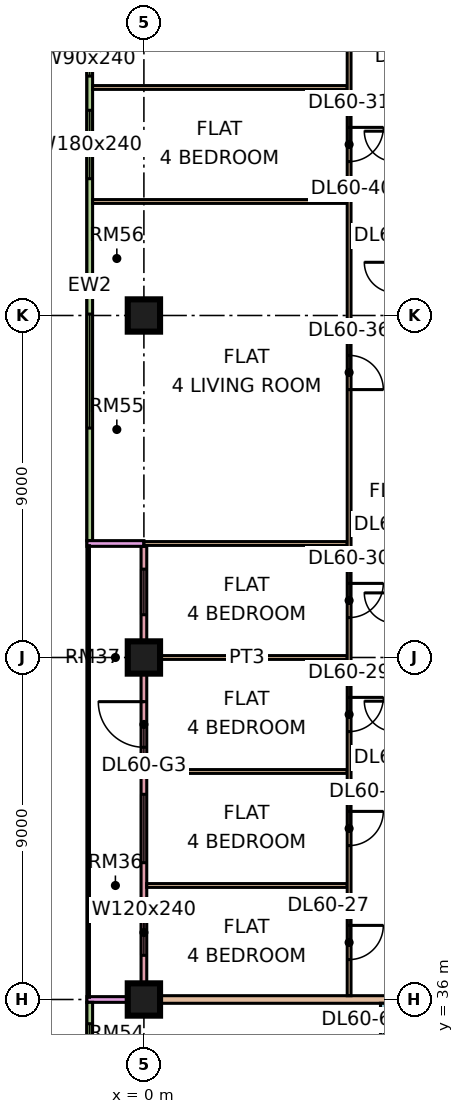
"""IFC4 building model, lengths in metres.
Left out: names, types, materials, properties, quantities, classifications, styles, units other than length and angle.
Written with IfcOpenShell. Run it as: python <this file> out.ifc"""

import sys

from ifc_helpers import new_model, si_unit, direction, frame, frame_2d, origin, origin_2d, place, context, subcontext, project, spatial, rectangle, extrude, element, fill, save


model = new_model("IFC4")
c1 = context("Model", 3, precision=1e-05, world=origin(), true_north=direction((0.0, 1.0)))
c2 = subcontext(c1, "Body", "Model", "MODEL_VIEW")
j1 = project(units=[si_unit("LENGTHUNIT", "METRE"), si_unit("PLANEANGLEUNIT", "RADIAN")], contexts=[c1])
p1 = place(None, origin())
s1 = spatial("IfcSite", under=j1, at=p1, CompositionType="ELEMENT")
p2 = place(p1, origin())
s2 = spatial("IfcBuilding", under=s1, at=p2, CompositionType="ELEMENT")
p3 = place(p2, frame((0.0, 0.0, 252.9)))
s3 = spatial("IfcBuildingStorey", under=s2, at=p3, CompositionType="ELEMENT", Elevation=252.9)
p4 = place(p3, frame((0.0, 36.0, 0.0), z_axis=(0.0, 0.0, 1.0), x_axis=(1.0, 0.0, 0.0)))
e1 = element("IfcColumn", 1, at=p4, inside=s3, PredefinedType="COLUMN", context=c2, shape_type="SweptSolid", body=[
    extrude(rectangle(XDim=0.85, YDim=0.85, at=origin_2d()), origin(), (0.0, 0.0, 1.0), 3.75),
])
for number, where, z_axis, x_axis in (
    (2, (0.0, 45.0, 0.0), (0.0, 0.0, 1.0), (1.0, 0.0, 0.0)),
    (3, (0.0, 54.0, 0.0), (0.0, 0.0, 1.0), (1.0, 0.0, 0.0)),
):
    element("IfcColumn", number, at=place(p3, frame(where, z_axis=z_axis, x_axis=x_axis)), inside=s3, PredefinedType="COLUMN", context=c2, shape_type="SweptSolid", body=[
        extrude(rectangle(XDim=0.85, YDim=0.85, at=origin_2d()), origin(), (0.0, 0.0, 1.0), 3.75),
    ])
p5 = place(p3, frame((-1.425, 61.5, 0.0), z_axis=(0.0, 0.0, 1.0), x_axis=(0.0, -1.0, 0.0)))
e4 = element("IfcWall", 4, at=p5, inside=s3, PredefinedType="SOLIDWALL", context=c2, shape_type="SweptSolid", body=[
    extrude(rectangle(XDim=13.425, YDim=0.15, at=frame_2d((6.712, 0.0))), origin(), (0.0, 0.0, 1.0), 3.3),
])
p6 = place(p5, frame((0.3, 0.0, 0.45)))
e5 = element("IfcOpeningElement", 5, at=p6, cuts=e4, PredefinedType="OPENING", context=c2, shape_type="SweptSolid", body=[
    extrude(rectangle(XDim=0.9, YDim=2.4, at=frame_2d((0.45, 1.2))), frame((0.0, 0.085, 0.0), z_axis=(0.0, -1.0, 0.0), x_axis=(1.0, 0.0, 0.0)), (0.0, 0.0, 1.0), 0.17),
])
p7 = place(p5, frame((2.1, 0.0, 0.45)))
e6 = element("IfcOpeningElement", 6, at=p7, cuts=e4, PredefinedType="OPENING", context=c2, shape_type="SweptSolid", body=[
    extrude(rectangle(XDim=1.8, YDim=2.4, at=frame_2d((0.9, 1.2))), frame((0.0, 0.085, 0.0), z_axis=(0.0, -1.0, 0.0), x_axis=(1.0, 0.0, 0.0)), (0.0, 0.0, 1.0), 0.17),
])
p8 = place(p5, frame((7.462, 0.0, 0.45)))
e7 = element("IfcOpeningElement", 7, at=p8, cuts=e4, PredefinedType="OPENING", context=c2, shape_type="SweptSolid", body=[
    extrude(rectangle(XDim=3.0, YDim=2.4, at=frame_2d((1.5, 1.2))), frame((0.0, 0.085, 0.0), z_axis=(0.0, -1.0, 0.0), x_axis=(1.0, 0.0, 0.0)), (0.0, 0.0, 1.0), 0.17),
])
p9 = place(p3, frame((0.0, 47.925, 0.0), z_axis=(0.0, 0.0, 1.0), x_axis=(0.0, -1.0, 0.0)))
e8 = element("IfcWall", 8, at=p9, inside=s3, PredefinedType="SOLIDWALL", context=c2, shape_type="SweptSolid", body=[
    extrude(rectangle(XDim=11.85, YDim=0.15, at=frame_2d((5.925, 0.0))), origin(), (0.0, 0.0, 1.0), 3.3),
])
p10 = place(p9, frame((0.6, 0.0, 0.45)))
e9 = element("IfcOpeningElement", 9, at=p10, cuts=e8, PredefinedType="OPENING", context=c2, shape_type="SweptSolid", body=[
    extrude(rectangle(XDim=1.2, YDim=2.4, at=frame_2d((0.6, 1.2))), frame((0.0, 0.085, 0.0), z_axis=(0.0, -1.0, 0.0), x_axis=(1.0, 0.0, 0.0)), (0.0, 0.0, 1.0), 0.17),
])
p11 = place(p9, frame((4.087, 0.0, 0.0)))
e10 = element("IfcOpeningElement", 10, at=p11, cuts=e8, PredefinedType="OPENING", context=c2, shape_type="SweptSolid", body=[
    extrude(rectangle(XDim=1.2, YDim=2.4, at=frame_2d((0.6, 1.2))), frame((0.0, 0.085, 0.0), z_axis=(0.0, -1.0, 0.0), x_axis=(1.0, 0.0, 0.0)), (0.0, 0.0, 1.0), 0.17),
])
p12 = place(p9, frame((6.525, 0.0, 0.45)))
e11 = element("IfcOpeningElement", 11, at=p12, cuts=e8, PredefinedType="OPENING", context=c2, shape_type="SweptSolid", body=[
    extrude(rectangle(XDim=1.8, YDim=2.4, at=frame_2d((0.9, 1.2))), frame((0.0, 0.085, 0.0), z_axis=(0.0, -1.0, 0.0), x_axis=(1.0, 0.0, 0.0)), (0.0, 0.0, 1.0), 0.17),
])
p13 = place(p9, frame((9.562, 0.0, 0.45)))
e12 = element("IfcOpeningElement", 12, at=p13, cuts=e8, PredefinedType="OPENING", context=c2, shape_type="SweptSolid", body=[
    extrude(rectangle(XDim=1.2, YDim=2.4, at=frame_2d((0.6, 1.2))), frame((0.0, 0.085, 0.0), z_axis=(0.0, -1.0, 0.0), x_axis=(1.0, 0.0, 0.0)), (0.0, 0.0, 1.0), 0.17),
])
for number, where, z_axis, x_axis in (
    (13, (-1.5, 48.0, 0.0), (0.0, 0.0, 1.0), (1.0, 0.0, 0.0)),
    (14, (-1.5, 36.0, 0.0), (0.0, 0.0, 1.0), (1.0, 0.0, 0.0)),
):
    element("IfcWall", number, at=place(p3, frame(where, z_axis=z_axis, x_axis=x_axis)), inside=s3, PredefinedType="SOLIDWALL", context=c2, shape_type="SweptSolid", body=[
        extrude(rectangle(XDim=1.5, YDim=0.15, at=frame_2d((0.75, 0.0))), origin(), (0.0, 0.0, 1.0), 3.3),
    ])
p14 = place(p3, frame((-1.425, 35.925, 0.0), z_axis=(0.0, 0.0, 1.0), x_axis=(0.0, -1.0, 0.0)))
e15 = element("IfcWall", 15, at=p14, inside=s3, PredefinedType="SOLIDWALL", context=c2, shape_type="SweptSolid", body=[
    extrude(rectangle(XDim=11.85, YDim=0.15, at=frame_2d((5.925, 0.0))), origin(), (0.0, 0.0, 1.0), 3.3),
])
p15 = place(p14, frame((0.562, 0.0, 0.45)))
e16 = element("IfcOpeningElement", 16, at=p15, cuts=e15, PredefinedType="OPENING", context=c2, shape_type="SweptSolid", body=[
    extrude(rectangle(XDim=1.8, YDim=2.4, at=frame_2d((0.9, 1.2))), frame((0.0, 0.085, 0.0), z_axis=(0.0, -1.0, 0.0), x_axis=(1.0, 0.0, 0.0)), (0.0, 0.0, 1.0), 0.17),
])
p16 = place(p14, frame((3.525, 0.0, 0.45)))
e17 = element("IfcOpeningElement", 17, at=p16, cuts=e15, PredefinedType="OPENING", context=c2, shape_type="SweptSolid", body=[
    extrude(rectangle(XDim=1.8, YDim=2.4, at=frame_2d((0.9, 1.2))), frame((0.0, 0.085, 0.0), z_axis=(0.0, -1.0, 0.0), x_axis=(1.0, 0.0, 0.0)), (0.0, 0.0, 1.0), 0.17),
])
p17 = place(p14, frame((6.525, 0.0, 0.45)))
e18 = element("IfcOpeningElement", 18, at=p17, cuts=e15, PredefinedType="OPENING", context=c2, shape_type="SweptSolid", body=[
    extrude(rectangle(XDim=1.8, YDim=2.4, at=frame_2d((0.9, 1.2))), frame((0.0, 0.085, 0.0), z_axis=(0.0, -1.0, 0.0), x_axis=(1.0, 0.0, 0.0)), (0.0, 0.0, 1.0), 0.17),
])
p18 = place(p14, frame((9.488, 0.0, 0.45)))
e19 = element("IfcOpeningElement", 19, at=p18, cuts=e15, PredefinedType="OPENING", context=c2, shape_type="SweptSolid", body=[
    extrude(rectangle(XDim=1.8, YDim=2.4, at=frame_2d((0.9, 1.2))), frame((0.0, 0.085, 0.0), z_axis=(0.0, -1.0, 0.0), x_axis=(1.0, 0.0, 0.0)), (0.0, 0.0, 1.0), 0.17),
])
p19 = place(p3, frame((-1.351, 60.0, 0.0), z_axis=(0.0, 0.0, 1.0), x_axis=(1.0, 0.0, 0.0)))
e20 = element("IfcWall", 20, at=p19, inside=s3, PredefinedType="PARTITIONING", context=c2, shape_type="SweptSolid", body=[
    extrude(rectangle(XDim=6.701, YDim=0.1, at=frame_2d((3.351, 0.0))), origin(), (0.0, 0.0, 1.0), 3.3),
])
e21 = element("IfcWall", 21, at=p4, inside=s3, PredefinedType="PARTITIONING", context=c2, shape_type="SweptSolid", body=[
    extrude(rectangle(XDim=6.375, YDim=0.2, at=frame_2d((3.188, 0.0))), origin(), (0.0, 0.0, 1.0), 3.3),
])
p20 = place(p3, frame((0.0, 48.0, 0.0), z_axis=(0.0, 0.0, 1.0), x_axis=(1.0, 0.0, 0.0)))
e22 = element("IfcWall", 22, at=p20, inside=s3, PredefinedType="PARTITIONING", context=c2, shape_type="SweptSolid", body=[
    extrude(rectangle(XDim=5.35, YDim=0.1, at=frame_2d((2.675, 0.0))), origin(), (0.0, 0.0, 1.0), 3.3),
])
p21 = place(p3, frame((-1.35, 57.0, 0.0), z_axis=(0.0, 0.0, 1.0), x_axis=(1.0, 0.0, 0.0)))
e23 = element("IfcWall", 23, at=p21, inside=s3, PredefinedType="PARTITIONING", context=c2, shape_type="SweptSolid", body=[
    extrude(rectangle(XDim=6.7, YDim=0.1, at=frame_2d((3.35, 0.0))), origin(), (0.0, 0.0, 1.0), 3.3),
])
for number, where, z_axis, x_axis in (
    (24, (0.074, 39.0, 0.0), (0.0, 0.0, 1.0), (1.0, 0.0, 0.0)),
    (25, (0.074, 42.0, 0.0), (0.0, 0.0, 1.0), (1.0, 0.0, 0.0)),
    (26, (0.074, 45.0, 0.0), (0.0, 0.0, 1.0), (1.0, 0.0, 0.0)),
):
    element("IfcWall", number, at=place(p3, frame(where, z_axis=z_axis, x_axis=x_axis)), inside=s3, PredefinedType="PARTITIONING", context=c2, shape_type="SweptSolid", body=[
        extrude(rectangle(XDim=5.276, YDim=0.1, at=frame_2d((2.638, 0.0))), origin(), (0.0, 0.0, 1.0), 3.3),
    ])
p22 = place(p3, frame((5.4, 36.1, 0.0), z_axis=(0.0, 0.0, 1.0), x_axis=(0.0, 1.0, 0.0)))
e27 = element("IfcWall", 27, at=p22, inside=s3, PredefinedType="PARTITIONING", context=c2, shape_type="SweptSolid", body=[
    extrude(rectangle(XDim=26.95, YDim=0.1, at=frame_2d((13.475, 0.0))), origin(), (0.0, 0.0, 1.0), 3.3),
])
p23 = place(p22, frame((0.95, 0.0, 0.0)))
e28 = element("IfcOpeningElement", 28, at=p23, cuts=e27, PredefinedType="OPENING", context=c2, shape_type="SweptSolid", body=[
    extrude(rectangle(XDim=0.9, YDim=2.1, at=frame_2d((0.45, 1.05))), frame((0.0, 0.06, 0.0), z_axis=(0.0, -1.0, 0.0), x_axis=(1.0, 0.0, 0.0)), (0.0, 0.0, 1.0), 0.12),
])
p24 = place(p22, frame((3.95, 0.0, 0.0)))
e29 = element("IfcOpeningElement", 29, at=p24, cuts=e27, PredefinedType="OPENING", context=c2, shape_type="SweptSolid", body=[
    extrude(rectangle(XDim=0.9, YDim=2.1, at=frame_2d((0.45, 1.05))), frame((0.0, 0.06, 0.0), z_axis=(0.0, -1.0, 0.0), x_axis=(1.0, 0.0, 0.0)), (0.0, 0.0, 1.0), 0.12),
])
p25 = place(p22, frame((6.95, 0.0, 0.0)))
e30 = element("IfcOpeningElement", 30, at=p25, cuts=e27, PredefinedType="OPENING", context=c2, shape_type="SweptSolid", body=[
    extrude(rectangle(XDim=0.9, YDim=2.1, at=frame_2d((0.45, 1.05))), frame((0.0, 0.06, 0.0), z_axis=(0.0, -1.0, 0.0), x_axis=(1.0, 0.0, 0.0)), (0.0, 0.0, 1.0), 0.12),
])
p26 = place(p22, frame((9.95, 0.0, 0.0)))
e31 = element("IfcOpeningElement", 31, at=p26, cuts=e27, PredefinedType="OPENING", context=c2, shape_type="SweptSolid", body=[
    extrude(rectangle(XDim=0.9, YDim=2.1, at=frame_2d((0.45, 1.05))), frame((0.0, 0.06, 0.0), z_axis=(0.0, -1.0, 0.0), x_axis=(1.0, 0.0, 0.0)), (0.0, 0.0, 1.0), 0.12),
])
p27 = place(p22, frame((21.95, 0.0, 0.0)))
e32 = element("IfcOpeningElement", 32, at=p27, cuts=e27, PredefinedType="OPENING", context=c2, shape_type="SweptSolid", body=[
    extrude(rectangle(XDim=0.9, YDim=2.1, at=frame_2d((0.45, 1.05))), frame((0.0, 0.06, 0.0), z_axis=(0.0, -1.0, 0.0), x_axis=(1.0, 0.0, 0.0)), (0.0, 0.0, 1.0), 0.12),
])
p28 = place(p22, frame((24.95, 0.0, 0.0)))
e33 = element("IfcOpeningElement", 33, at=p28, cuts=e27, PredefinedType="OPENING", context=c2, shape_type="SweptSolid", body=[
    extrude(rectangle(XDim=0.9, YDim=2.1, at=frame_2d((0.45, 1.05))), frame((0.0, 0.06, 0.0), z_axis=(0.0, -1.0, 0.0), x_axis=(1.0, 0.0, 0.0)), (0.0, 0.0, 1.0), 0.12),
])
p29 = place(p22, frame((15.95, 0.0, 0.0)))
e34 = element("IfcOpeningElement", 34, at=p29, cuts=e27, PredefinedType="OPENING", context=c2, shape_type="SweptSolid", body=[
    extrude(rectangle(XDim=0.9, YDim=2.1, at=frame_2d((0.45, 1.05))), frame((0.0, 0.06, 0.0), z_axis=(0.0, -1.0, 0.0), x_axis=(1.0, 0.0, 0.0)), (0.0, 0.0, 1.0), 0.12),
])
p30 = place(p3, frame((6.3, 26.325, 0.0), z_axis=(0.0, 0.0, 1.0), x_axis=(0.0, 1.0, 0.0)))
e35 = element("IfcWall", 35, at=p30, inside=s3, PredefinedType="PARTITIONING", context=c2, shape_type="SweptSolid", body=[
    extrude(rectangle(XDim=9.575, YDim=0.15, at=frame_2d((4.788, 0.0))), origin(), (0.0, 0.0, 1.0), 3.3),
])
p31 = place(p30, frame((4.575, 0.0, 0.0)))
e36 = element("IfcOpeningElement", 36, at=p31, cuts=e35, PredefinedType="OPENING", context=c2, shape_type="SweptSolid", body=[
    extrude(rectangle(XDim=0.8, YDim=2.1, at=frame_2d((0.4, 1.05))), frame((0.0, 0.085, 0.0), z_axis=(0.0, -1.0, 0.0), x_axis=(1.0, 0.0, 0.0)), (0.0, 0.0, 1.0), 0.17),
])
p32 = place(p30, frame((7.725, 0.0, 0.0)))
e37 = element("IfcOpeningElement", 37, at=p32, cuts=e35, PredefinedType="OPENING", context=c2, shape_type="SweptSolid", body=[
    extrude(rectangle(XDim=0.9, YDim=2.1, at=frame_2d((0.45, 1.05))), frame((0.0, 0.085, 0.0), z_axis=(0.0, -1.0, 0.0), x_axis=(1.0, 0.0, 0.0)), (0.0, 0.0, 1.0), 0.17),
])
p33 = place(p6, origin())
e38 = element("IfcWindow", 38, at=p33, inside=s3, PartitioningType="SINGLE_PANEL", PredefinedType="WINDOW", context=c2, shape_type="SweptSolid", body=[
    extrude(rectangle(XDim=0.9, YDim=2.4, at=frame_2d((0.45, 1.2))), frame((0.0, 0.03, 0.0), z_axis=(0.0, -1.0, 0.0), x_axis=(1.0, 0.0, 0.0)), (0.0, 0.0, 1.0), 0.06),
])
fill(e5, e38)
p34 = place(p7, origin())
e39 = element("IfcWindow", 39, at=p34, inside=s3, PartitioningType="SINGLE_PANEL", PredefinedType="WINDOW", context=c2, shape_type="SweptSolid", body=[
    extrude(rectangle(XDim=1.8, YDim=2.4, at=frame_2d((0.9, 1.2))), frame((0.0, 0.03, 0.0), z_axis=(0.0, -1.0, 0.0), x_axis=(1.0, 0.0, 0.0)), (0.0, 0.0, 1.0), 0.06),
])
fill(e6, e39)
p35 = place(p8, origin())
e40 = element("IfcWindow", 40, at=p35, inside=s3, PartitioningType="SINGLE_PANEL", PredefinedType="WINDOW", context=c2, shape_type="SweptSolid", body=[
    extrude(rectangle(XDim=3.0, YDim=2.4, at=frame_2d((1.5, 1.2))), frame((0.0, 0.03, 0.0), z_axis=(0.0, -1.0, 0.0), x_axis=(1.0, 0.0, 0.0)), (0.0, 0.0, 1.0), 0.06),
])
fill(e7, e40)
p36 = place(p10, origin())
e41 = element("IfcWindow", 41, at=p36, inside=s3, PartitioningType="SINGLE_PANEL", PredefinedType="WINDOW", context=c2, shape_type="SweptSolid", body=[
    extrude(rectangle(XDim=1.2, YDim=2.4, at=frame_2d((0.6, 1.2))), frame((0.0, 0.03, 0.0), z_axis=(0.0, -1.0, 0.0), x_axis=(1.0, 0.0, 0.0)), (0.0, 0.0, 1.0), 0.06),
])
fill(e9, e41)
p37 = place(p11, frame((1.2, 0.0, 0.0), z_axis=(0.0, 0.0, 1.0), x_axis=(-1.0, 0.0, 0.0)))
e42 = element("IfcDoor", 42, at=p37, inside=s3, OperationType="DOUBLE_DOOR_SINGLE_SWING", PredefinedType="DOOR", context=c2, shape_type="SweptSolid", body=[
    extrude(rectangle(XDim=1.2, YDim=2.4, at=frame_2d((0.6, 1.2))), frame((0.0, 0.025, 0.0), z_axis=(0.0, -1.0, 0.0), x_axis=(1.0, 0.0, 0.0)), (0.0, 0.0, 1.0), 0.05),
])
fill(e10, e42)
p38 = place(p12, origin())
e43 = element("IfcWindow", 43, at=p38, inside=s3, PartitioningType="SINGLE_PANEL", PredefinedType="WINDOW", context=c2, shape_type="SweptSolid", body=[
    extrude(rectangle(XDim=1.8, YDim=2.4, at=frame_2d((0.9, 1.2))), frame((0.0, 0.03, 0.0), z_axis=(0.0, -1.0, 0.0), x_axis=(1.0, 0.0, 0.0)), (0.0, 0.0, 1.0), 0.06),
])
fill(e11, e43)
p39 = place(p13, origin())
e44 = element("IfcWindow", 44, at=p39, inside=s3, PartitioningType="SINGLE_PANEL", PredefinedType="WINDOW", context=c2, shape_type="SweptSolid", body=[
    extrude(rectangle(XDim=1.2, YDim=2.4, at=frame_2d((0.6, 1.2))), frame((0.0, 0.03, 0.0), z_axis=(0.0, -1.0, 0.0), x_axis=(1.0, 0.0, 0.0)), (0.0, 0.0, 1.0), 0.06),
])
fill(e12, e44)
p40 = place(p15, origin())
e45 = element("IfcWindow", 45, at=p40, inside=s3, PartitioningType="SINGLE_PANEL", PredefinedType="WINDOW", context=c2, shape_type="SweptSolid", body=[
    extrude(rectangle(XDim=1.8, YDim=2.4, at=frame_2d((0.9, 1.2))), frame((0.0, 0.03, 0.0), z_axis=(0.0, -1.0, 0.0), x_axis=(1.0, 0.0, 0.0)), (0.0, 0.0, 1.0), 0.06),
])
fill(e16, e45)
p41 = place(p23, origin())
e46 = element("IfcDoor", 46, at=p41, inside=s3, OperationType="SINGLE_SWING_RIGHT", PredefinedType="DOOR", context=c2, shape_type="SweptSolid", body=[
    extrude(rectangle(XDim=0.9, YDim=2.1, at=frame_2d((0.45, 1.05))), frame((0.0, 0.025, 0.0), z_axis=(0.0, -1.0, 0.0), x_axis=(1.0, 0.0, 0.0)), (0.0, 0.0, 1.0), 0.05),
])
fill(e28, e46)
p42 = place(p24, origin())
e47 = element("IfcDoor", 47, at=p42, inside=s3, OperationType="SINGLE_SWING_RIGHT", PredefinedType="DOOR", context=c2, shape_type="SweptSolid", body=[
    extrude(rectangle(XDim=0.9, YDim=2.1, at=frame_2d((0.45, 1.05))), frame((0.0, 0.025, 0.0), z_axis=(0.0, -1.0, 0.0), x_axis=(1.0, 0.0, 0.0)), (0.0, 0.0, 1.0), 0.05),
])
fill(e29, e47)
p43 = place(p25, origin())
e48 = element("IfcDoor", 48, at=p43, inside=s3, OperationType="SINGLE_SWING_RIGHT", PredefinedType="DOOR", context=c2, shape_type="SweptSolid", body=[
    extrude(rectangle(XDim=0.9, YDim=2.1, at=frame_2d((0.45, 1.05))), frame((0.0, 0.025, 0.0), z_axis=(0.0, -1.0, 0.0), x_axis=(1.0, 0.0, 0.0)), (0.0, 0.0, 1.0), 0.05),
])
fill(e30, e48)
p44 = place(p26, origin())
e49 = element("IfcDoor", 49, at=p44, inside=s3, OperationType="SINGLE_SWING_RIGHT", PredefinedType="DOOR", context=c2, shape_type="SweptSolid", body=[
    extrude(rectangle(XDim=0.9, YDim=2.1, at=frame_2d((0.45, 1.05))), frame((0.0, 0.025, 0.0), z_axis=(0.0, -1.0, 0.0), x_axis=(1.0, 0.0, 0.0)), (0.0, 0.0, 1.0), 0.05),
])
fill(e31, e49)
p45 = place(p27, origin())
e50 = element("IfcDoor", 50, at=p45, inside=s3, OperationType="SINGLE_SWING_RIGHT", PredefinedType="DOOR", context=c2, shape_type="SweptSolid", body=[
    extrude(rectangle(XDim=0.9, YDim=2.1, at=frame_2d((0.45, 1.05))), frame((0.0, 0.025, 0.0), z_axis=(0.0, -1.0, 0.0), x_axis=(1.0, 0.0, 0.0)), (0.0, 0.0, 1.0), 0.05),
])
fill(e32, e50)
p46 = place(p29, frame((0.9, 0.0, 0.0), z_axis=(0.0, 0.0, 1.0), x_axis=(-1.0, 0.0, 0.0)))
e51 = element("IfcDoor", 51, at=p46, inside=s3, OperationType="SINGLE_SWING_LEFT", PredefinedType="DOOR", context=c2, shape_type="SweptSolid", body=[
    extrude(rectangle(XDim=0.9, YDim=2.1, at=frame_2d((0.45, 1.05))), frame((0.0, 0.025, 0.0), z_axis=(0.0, -1.0, 0.0), x_axis=(1.0, 0.0, 0.0)), (0.0, 0.0, 1.0), 0.05),
])
fill(e34, e51)
save(model, sys.argv[1])
